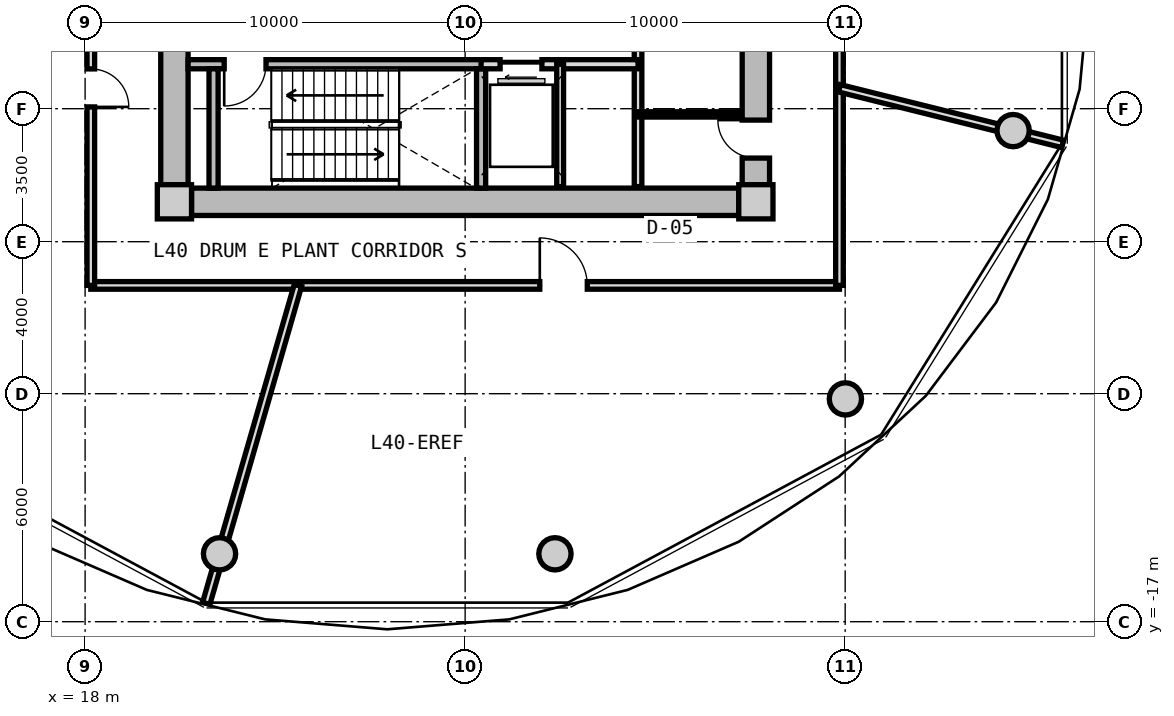
"""IFC4 building model, lengths in metres.
Left out: names, types, materials, properties, quantities, classifications, styles, units other than length and angle.
Written with IfcOpenShell. Run it as: python <this file> out.ifc"""

import sys

from ifc_helpers import new_model, si_unit, direction, frame, frame_2d, origin, origin_2d, place, context, subcontext, project, spatial, rectangle, circle, extrude, source, transform, mapped, element, fill, save


model = new_model("IFC4")
c1 = context("Model", 3, precision=1e-05, world=origin(), true_north=direction((0.0, 1.0)))
c2 = subcontext(c1, "Body", "Model", "MODEL_VIEW")
j1 = project(units=[si_unit("LENGTHUNIT", "METRE"), si_unit("PLANEANGLEUNIT", "RADIAN")], contexts=[c1])
p1 = place(None, origin())
s1 = spatial("IfcSite", under=j1, at=p1, CompositionType="ELEMENT")
p2 = place(p1, origin())
s2 = spatial("IfcBuilding", under=s1, at=p2, CompositionType="ELEMENT")
p3 = place(p2, frame((0.0, 0.0, 129.8)))
s3 = spatial("IfcBuildingStorey", under=s2, at=p3, CompositionType="ELEMENT", Elevation=129.8)
m1 = source(origin(), c2, "Body", "SweptSolid", [
    extrude(rectangle(XDim=0.9, YDim=0.9, at=origin_2d()), origin(), (0.0, 0.0, 1.0), 4.5),
])
for number, where, z_axis, x_axis in (
    (1, (20.35, -5.95, 0.0), (0.0, 0.0, 1.0), (1.0, 0.0, 0.0)),
    (2, (35.65, -5.95, 0.0), (0.0, 0.0, 1.0), (1.0, 0.0, 0.0)),
):
    element("IfcColumn", number, at=place(p3, frame(where, z_axis=z_axis, x_axis=x_axis)), inside=s3, PredefinedType="COLUMN", context=c2, shape_type="MappedRepresentation", body=[
        mapped(m1, transform((0.0, 0.0, 0.0), x_axis=(1.0, 0.0, 0.0), y_axis=(0.0, 1.0, 0.0), z_axis=(0.0, 0.0, 1.0), scale=1.0)),
    ])
m2 = source(origin(), c2, "Body", "SweptSolid", [
    extrude(rectangle(XDim=14.4, YDim=0.72, at=frame_2d((7.2, 0.0))), origin(), (0.0, 0.0, 1.0), 4.08),
])
p4 = place(p3, frame((35.2, -5.95, 0.0), z_axis=(0.0, 0.0, 1.0), x_axis=(-1.0, 0.0, 0.0)))
e3 = element("IfcWall", 3, at=p4, inside=s3, PredefinedType="SHEAR", context=c2, shape_type="MappedRepresentation", body=[
    mapped(m2, transform((0.0, 0.0, 0.0), x_axis=(1.0, 0.0, 0.0), y_axis=(0.0, 1.0, 0.0), z_axis=(0.0, 0.0, 1.0), scale=1.0)),
])
m3 = source(origin(), c2, "Body", "SweptSolid", [
    extrude(rectangle(XDim=11.0, YDim=0.72, at=frame_2d((5.5, 0.0))), origin(), (0.0, 0.0, 1.0), 4.08),
])
p5 = place(p3, frame((20.35, -5.5, 0.0), z_axis=(0.0, 0.0, 1.0), x_axis=(0.0, 1.0, 0.0)))
e4 = element("IfcWall", 4, at=p5, inside=s3, PredefinedType="SHEAR", context=c2, shape_type="MappedRepresentation", body=[
    mapped(m3, transform((0.0, 0.0, 0.0), x_axis=(1.0, 0.0, 0.0), y_axis=(0.0, 1.0, 0.0), z_axis=(0.0, 0.0, 1.0), scale=1.0)),
])
p6 = place(p5, frame((3.8, 0.0, 0.0)))
e5 = element("IfcOpeningElement", 5, at=p6, cuts=e4, PredefinedType="OPENING", context=c2, shape_type="SweptSolid", body=[
    extrude(rectangle(XDim=1.2, YDim=2.15, at=frame_2d((0.6, 1.075))), frame((0.0, 0.37, 0.0), z_axis=(0.0, -1.0, 0.0), x_axis=(1.0, 0.0, 0.0)), (0.0, 0.0, 1.0), 0.74),
])
p7 = place(p3, frame((35.65, 5.5, 0.0), z_axis=(0.0, 0.0, 1.0), x_axis=(0.0, -1.0, 0.0)))
e6 = element("IfcWall", 6, at=p7, inside=s3, PredefinedType="SHEAR", context=c2, shape_type="MappedRepresentation", body=[
    mapped(m3, transform((0.0, 0.0, 0.0), x_axis=(1.0, 0.0, 0.0), y_axis=(0.0, 1.0, 0.0), z_axis=(0.0, 0.0, 1.0), scale=1.0)),
])
p8 = place(p7, frame((5.65, 0.0, 0.0)))
e7 = element("IfcOpeningElement", 7, at=p8, cuts=e6, PredefinedType="OPENING", context=c2, shape_type="SweptSolid", body=[
    extrude(rectangle(XDim=1.2, YDim=2.15, at=frame_2d((0.6, 1.075))), frame((0.0, 0.37, 0.0), z_axis=(0.0, -1.0, 0.0), x_axis=(1.0, 0.0, 0.0)), (0.0, 0.0, 1.0), 0.74),
])
p9 = place(p7, frame((9.3, 0.0, 0.0)))
e8 = element("IfcOpeningElement", 8, at=p9, cuts=e6, PredefinedType="OPENING", context=c2, shape_type="SweptSolid", body=[
    extrude(rectangle(XDim=1.0, YDim=2.1, at=frame_2d((0.5, 1.05))), frame((0.0, 0.37, 0.0), z_axis=(0.0, -1.0, 0.0), x_axis=(1.0, 0.0, 0.0)), (0.0, 0.0, 1.0), 0.74),
])
m4 = source(origin(), c2, "Body", "SweptSolid", [
    extrude(circle(Radius=0.425, at=origin_2d()), origin(), (0.0, 0.0, 1.0), 4.08),
])
for number, where, z_axis, x_axis in (
    (9, (21.537, -15.213, 0.0), (0.0, 0.0, 1.0), (1.0, 0.0, 0.0)),
    (10, (30.363, -15.213, 0.0), (0.0, 0.0, 1.0), (1.0, 0.0, 0.0)),
    (11, (38.006, -11.137, 0.0), (0.0, 0.0, 1.0), (1.0, 0.0, 0.0)),
    (12, (42.419, -4.076, 0.0), (0.0, 0.0, 1.0), (1.0, 0.0, 0.0)),
):
    element("IfcColumn", number, at=place(p3, frame(where, z_axis=z_axis, x_axis=x_axis)), inside=s3, PredefinedType="COLUMN", context=c2, shape_type="MappedRepresentation", body=[
        mapped(m4, transform((0.0, 0.0, 0.0), x_axis=(1.0, 0.0, 0.0), y_axis=(0.0, 1.0, 0.0), z_axis=(0.0, 0.0, 1.0), scale=1.0)),
    ])
m5 = source(origin(), c2, "Body", "SweptSolid", [
    extrude(rectangle(XDim=7.83, YDim=0.24, at=frame_2d((3.915, 0.0))), origin(), (0.0, 0.0, 1.0), 4.08),
])
p10 = place(p3, frame((20.71, -2.33, 0.0), z_axis=(0.0, 0.0, 1.0), x_axis=(1.0, 0.0, 0.0)))
e13 = element("IfcWall", 13, at=p10, inside=s3, PredefinedType="PARTITIONING", context=c2, shape_type="MappedRepresentation", body=[
    mapped(m5, transform((0.0, 0.0, 0.0), x_axis=(1.0, 0.0, 0.0), y_axis=(0.0, 1.0, 0.0), z_axis=(0.0, 0.0, 1.0), scale=1.0)),
])
p11 = place(p10, frame((0.95, 0.0, 0.0)))
e14 = element("IfcOpeningElement", 14, at=p11, cuts=e13, PredefinedType="OPENING", context=c2, shape_type="SweptSolid", body=[
    extrude(rectangle(XDim=1.1, YDim=2.15, at=frame_2d((0.55, 1.075))), frame((0.0, 0.13, 0.0), z_axis=(0.0, -1.0, 0.0), x_axis=(1.0, 0.0, 0.0)), (0.0, 0.0, 1.0), 0.26),
])
m6 = source(origin(), c2, "Body", "SweptSolid", [
    extrude(rectangle(XDim=3.14, YDim=0.24, at=frame_2d((1.57, 0.0))), origin(), (0.0, 0.0, 1.0), 4.08),
])
for number, where, z_axis, x_axis in (
    (15, (21.38, -5.59, 0.0), (0.0, 0.0, 1.0), (0.0, 1.0, 0.0)),
    (16, (28.42, -5.59, 0.0), (0.0, 0.0, 1.0), (0.0, 1.0, 0.0)),
):
    element("IfcWall", number, at=place(p3, frame(where, z_axis=z_axis, x_axis=x_axis)), inside=s3, PredefinedType="PARTITIONING", context=c2, shape_type="MappedRepresentation", body=[
        mapped(m6, transform((0.0, 0.0, 0.0), x_axis=(1.0, 0.0, 0.0), y_axis=(0.0, 1.0, 0.0), z_axis=(0.0, 0.0, 1.0), scale=1.0)),
    ])
m7 = source(origin(), c2, "Body", "SweptSolid", [
    extrude(rectangle(XDim=3.8, YDim=0.2, at=frame_2d((1.9, 0.0))), origin(), (0.0, 0.0, 1.0), 4.065),
])
p12 = place(p3, frame((32.55, -5.55, 0.0), z_axis=(0.0, 0.0, 1.0), x_axis=(0.0, 1.0, 0.0)))
e17 = element("IfcWall", 17, at=p12, inside=s3, PredefinedType="PARTITIONING", context=c2, shape_type="MappedRepresentation", body=[
    mapped(m7, transform((0.0, 0.0, 0.0), x_axis=(1.0, 0.0, 0.0), y_axis=(0.0, 1.0, 0.0), z_axis=(0.0, 0.0, 1.0), scale=1.0)),
])
m8 = source(origin(), c2, "Body", "SweptSolid", [
    extrude(rectangle(XDim=4.13, YDim=0.24, at=frame_2d((2.065, 0.0))), origin(), (0.0, 0.0, 1.0), 4.065),
])
p13 = place(p3, frame((28.42, -2.33, 0.0), z_axis=(0.0, 0.0, 1.0), x_axis=(1.0, 0.0, 0.0)))
e18 = element("IfcWall", 18, at=p13, inside=s3, PredefinedType="PARTITIONING", context=c2, shape_type="MappedRepresentation", body=[
    mapped(m8, transform((0.0, 0.0, 0.0), x_axis=(1.0, 0.0, 0.0), y_axis=(0.0, 1.0, 0.0), z_axis=(0.0, 0.0, 1.0), scale=1.0)),
])
p14 = place(p13, frame((0.5, 0.0, 0.0)))
e19 = element("IfcOpeningElement", 19, at=p14, cuts=e18, PredefinedType="OPENING", context=c2, shape_type="SweptSolid", body=[
    extrude(rectangle(XDim=1.1, YDim=2.2, at=frame_2d((0.55, 1.1))), frame((0.0, 0.13, 0.0), z_axis=(0.0, -1.0, 0.0), x_axis=(1.0, 0.0, 0.0)), (0.0, 0.0, 1.0), 0.26),
])
m9 = source(origin(), c2, "Body", "SweptSolid", [
    extrude(rectangle(XDim=3.22, YDim=0.18, at=frame_2d((1.61, 0.0))), origin(), (0.0, 0.0, 1.0), 4.065),
])
p15 = place(p3, frame((30.5, -5.55, 0.0), z_axis=(0.0, 0.0, 1.0), x_axis=(0.0, 1.0, 0.0)))
e20 = element("IfcWall", 20, at=p15, inside=s3, PredefinedType="PARTITIONING", context=c2, shape_type="MappedRepresentation", body=[
    mapped(m9, transform((0.0, 0.0, 0.0), x_axis=(1.0, 0.0, 0.0), y_axis=(0.0, 1.0, 0.0), z_axis=(0.0, 0.0, 1.0), scale=1.0)),
])
m10 = source(origin(), c2, "Body", "SweptSolid", [
    extrude(rectangle(XDim=2.7, YDim=0.14, at=frame_2d((1.35, 0.0))), origin(), (0.0, 0.0, 1.0), 4.065),
])
p16 = place(p3, frame((32.55, -3.65, 0.0), z_axis=(0.0, 0.0, 1.0), x_axis=(1.0, 0.0, 0.0)))
e21 = element("IfcWall", 21, at=p16, inside=s3, PredefinedType="PARTITIONING", context=c2, shape_type="MappedRepresentation", body=[
    mapped(m10, transform((0.0, 0.0, 0.0), x_axis=(1.0, 0.0, 0.0), y_axis=(0.0, 1.0, 0.0), z_axis=(0.0, 0.0, 1.0), scale=1.0)),
])
m11 = source(origin(), c2, "Body", "SweptSolid", [
    extrude(rectangle(XDim=19.7, YDim=0.2, at=frame_2d((9.85, 0.0))), origin(), (0.0, 0.0, 1.0), 4.065),
])
p17 = place(p3, frame((37.85, -8.15, 0.0), z_axis=(0.0, 0.0, 1.0), x_axis=(-1.0, 0.0, 0.0)))
e22 = element("IfcWall", 22, at=p17, inside=s3, PredefinedType="PARTITIONING", context=c2, shape_type="MappedRepresentation", body=[
    mapped(m11, transform((0.0, 0.0, 0.0), x_axis=(1.0, 0.0, 0.0), y_axis=(0.0, 1.0, 0.0), z_axis=(0.0, 0.0, 1.0), scale=1.0)),
])
p18 = place(p17, frame((6.636, 0.0, 0.0)))
e23 = element("IfcOpeningElement", 23, at=p18, cuts=e22, PredefinedType="OPENING", context=c2, shape_type="SweptSolid", body=[
    extrude(rectangle(XDim=1.25, YDim=2.2, at=frame_2d((0.625, 1.1))), frame((0.0, 0.11, 0.0), z_axis=(0.0, -1.0, 0.0), x_axis=(1.0, 0.0, 0.0)), (0.0, 0.0, 1.0), 0.22),
])
m12 = source(origin(), c2, "Body", "SweptSolid", [
    extrude(rectangle(XDim=16.3, YDim=0.2, at=frame_2d((8.15, 0.0))), origin(), (0.0, 0.0, 1.0), 4.065),
])
p19 = place(p3, frame((18.15, -8.15, 0.0), z_axis=(0.0, 0.0, 1.0), x_axis=(0.0, 1.0, 0.0)))
e24 = element("IfcWall", 24, at=p19, inside=s3, PredefinedType="PARTITIONING", context=c2, shape_type="MappedRepresentation", body=[
    mapped(m12, transform((0.0, 0.0, 0.0), x_axis=(1.0, 0.0, 0.0), y_axis=(0.0, 1.0, 0.0), z_axis=(0.0, 0.0, 1.0), scale=1.0)),
])
p20 = place(p19, frame((4.697, 0.0, 0.0)))
e25 = element("IfcOpeningElement", 25, at=p20, cuts=e24, PredefinedType="OPENING", context=c2, shape_type="SweptSolid", body=[
    extrude(rectangle(XDim=1.0, YDim=2.1, at=frame_2d((0.5, 1.05))), frame((0.0, 0.11, 0.0), z_axis=(0.0, -1.0, 0.0), x_axis=(1.0, 0.0, 0.0)), (0.0, 0.0, 1.0), 0.22),
])
p21 = place(p3, frame((37.85, 8.15, 0.0), z_axis=(0.0, 0.0, 1.0), x_axis=(0.0, -1.0, 0.0)))
e26 = element("IfcWall", 26, at=p21, inside=s3, PredefinedType="PARTITIONING", context=c2, shape_type="MappedRepresentation", body=[
    mapped(m12, transform((0.0, 0.0, 0.0), x_axis=(1.0, 0.0, 0.0), y_axis=(0.0, 1.0, 0.0), z_axis=(0.0, 0.0, 1.0), scale=1.0)),
])
p22 = place(p21, frame((5.211, 0.0, 0.0)))
e27 = element("IfcOpeningElement", 27, at=p22, cuts=e26, PredefinedType="OPENING", context=c2, shape_type="SweptSolid", body=[
    extrude(rectangle(XDim=1.0, YDim=2.1, at=frame_2d((0.5, 1.05))), frame((0.0, 0.11, 0.0), z_axis=(0.0, -1.0, 0.0), x_axis=(1.0, 0.0, 0.0)), (0.0, 0.0, 1.0), 0.22),
])
m13 = source(origin(), c2, "Body", "SweptSolid", [
    extrude(rectangle(XDim=8.708, YDim=0.2, at=frame_2d((4.354, 0.0))), origin(), (0.0, 0.0, 1.0), 2.515),
])
p23 = place(p3, frame((23.6, -8.15, 0.0), z_axis=(0.0, 0.0, 1.0), x_axis=(-0.277019790717, -0.960864212858, 0.0)))
e28 = element("IfcWall", 28, at=p23, inside=s3, PredefinedType="PARTITIONING", context=c2, shape_type="MappedRepresentation", body=[
    mapped(m13, transform((0.0, 0.0, 0.0), x_axis=(1.0, 0.0, 0.0), y_axis=(0.0, 1.0, 0.0), z_axis=(0.0, 0.0, 1.0), scale=1.0)),
])
m14 = source(origin(), c2, "Body", "SweptSolid", [
    extrude(rectangle(XDim=6.052, YDim=0.2, at=frame_2d((3.026, 0.0))), origin(), (0.0, 0.0, 1.0), 4.065),
])
p24 = place(p3, frame((37.85, -2.963, 0.0), z_axis=(0.0, 0.0, 1.0), x_axis=(0.970369863069, -0.24162435483, 0.0)))
e29 = element("IfcWall", 29, at=p24, inside=s3, PredefinedType="PARTITIONING", context=c2, shape_type="MappedRepresentation", body=[
    mapped(m14, transform((0.0, 0.0, 0.0), x_axis=(1.0, 0.0, 0.0), y_axis=(0.0, 1.0, 0.0), z_axis=(0.0, 0.0, 1.0), scale=1.0)),
])
m15 = source(origin(), c2, "Body", "SweptSolid", [
    extrude(rectangle(XDim=1.1, YDim=2.15, at=frame_2d((0.55, 1.075))), frame((0.0, 0.025, 0.0), z_axis=(0.0, -1.0, 0.0), x_axis=(1.0, 0.0, 0.0)), (0.0, 0.0, 1.0), 0.05),
])
p25 = place(p11, frame((1.1, 0.0, 0.0), z_axis=(0.0, 0.0, 1.0), x_axis=(-1.0, 0.0, 0.0)))
e30 = element("IfcDoor", 30, at=p25, inside=s3, OperationType="SINGLE_SWING_RIGHT", PredefinedType="DOOR", context=c2, shape_type="MappedRepresentation", body=[
    mapped(m15, transform((0.0, 0.0, 0.0), x_axis=(1.0, 0.0, 0.0), y_axis=(0.0, 1.0, 0.0), z_axis=(0.0, 0.0, 1.0), scale=1.0)),
])
fill(e14, e30)
m16 = source(origin(), c2, "Body", "SweptSolid", [
    extrude(rectangle(XDim=1.1, YDim=2.2, at=frame_2d((0.55, 1.1))), frame((0.0, 0.025, 0.0), z_axis=(0.0, -1.0, 0.0), x_axis=(1.0, 0.0, 0.0)), (0.0, 0.0, 1.0), 0.05),
])
p26 = place(p14, frame((1.1, 0.0, 0.0), z_axis=(0.0, 0.0, 1.0), x_axis=(-1.0, 0.0, 0.0)))
e31 = element("IfcDoor", 31, at=p26, inside=s3, OperationType="SLIDING_TO_LEFT", PredefinedType="DOOR", context=c2, shape_type="MappedRepresentation", body=[
    mapped(m16, transform((0.0, 0.0, 0.0), x_axis=(1.0, 0.0, 0.0), y_axis=(0.0, 1.0, 0.0), z_axis=(0.0, 0.0, 1.0), scale=1.0)),
])
fill(e19, e31)
m17 = source(origin(), c2, "Body", "SweptSolid", [
    extrude(rectangle(XDim=1.0, YDim=2.1, at=frame_2d((0.5, 1.05))), frame((0.0, 0.025, 0.0), z_axis=(0.0, -1.0, 0.0), x_axis=(1.0, 0.0, 0.0)), (0.0, 0.0, 1.0), 0.05),
])
p27 = place(p9, frame((1.0, 0.0, 0.0), z_axis=(0.0, 0.0, 1.0), x_axis=(-1.0, 0.0, 0.0)))
e32 = element("IfcDoor", 32, at=p27, inside=s3, OperationType="SINGLE_SWING_RIGHT", PredefinedType="DOOR", context=c2, shape_type="MappedRepresentation", body=[
    mapped(m17, transform((0.0, 0.0, 0.0), x_axis=(1.0, 0.0, 0.0), y_axis=(0.0, 1.0, 0.0), z_axis=(0.0, 0.0, 1.0), scale=1.0)),
])
fill(e8, e32)
m18 = source(origin(), c2, "Body", "SweptSolid", [
    extrude(rectangle(XDim=1.25, YDim=2.2, at=frame_2d((0.625, 1.1))), frame((0.0, 0.025, 0.0), z_axis=(0.0, -1.0, 0.0), x_axis=(1.0, 0.0, 0.0)), (0.0, 0.0, 1.0), 0.05),
])
p28 = place(p18, frame((1.25, 0.0, 0.0), z_axis=(0.0, 0.0, 1.0), x_axis=(-1.0, 0.0, 0.0)))
e33 = element("IfcDoor", 33, at=p28, inside=s3, OperationType="SINGLE_SWING_LEFT", PredefinedType="DOOR", context=c2, shape_type="MappedRepresentation", body=[
    mapped(m18, transform((0.0, 0.0, 0.0), x_axis=(1.0, 0.0, 0.0), y_axis=(0.0, 1.0, 0.0), z_axis=(0.0, 0.0, 1.0), scale=1.0)),
])
fill(e23, e33)
p29 = place(p20, frame((1.0, 0.0, 0.0), z_axis=(0.0, 0.0, 1.0), x_axis=(-1.0, 0.0, 0.0)))
e34 = element("IfcDoor", 34, at=p29, inside=s3, OperationType="SINGLE_SWING_RIGHT", PredefinedType="DOOR", context=c2, shape_type="MappedRepresentation", body=[
    mapped(m17, transform((0.0, 0.0, 0.0), x_axis=(1.0, 0.0, 0.0), y_axis=(0.0, 1.0, 0.0), z_axis=(0.0, 0.0, 1.0), scale=1.0)),
])
fill(e25, e34)
save(model, sys.argv[1])
